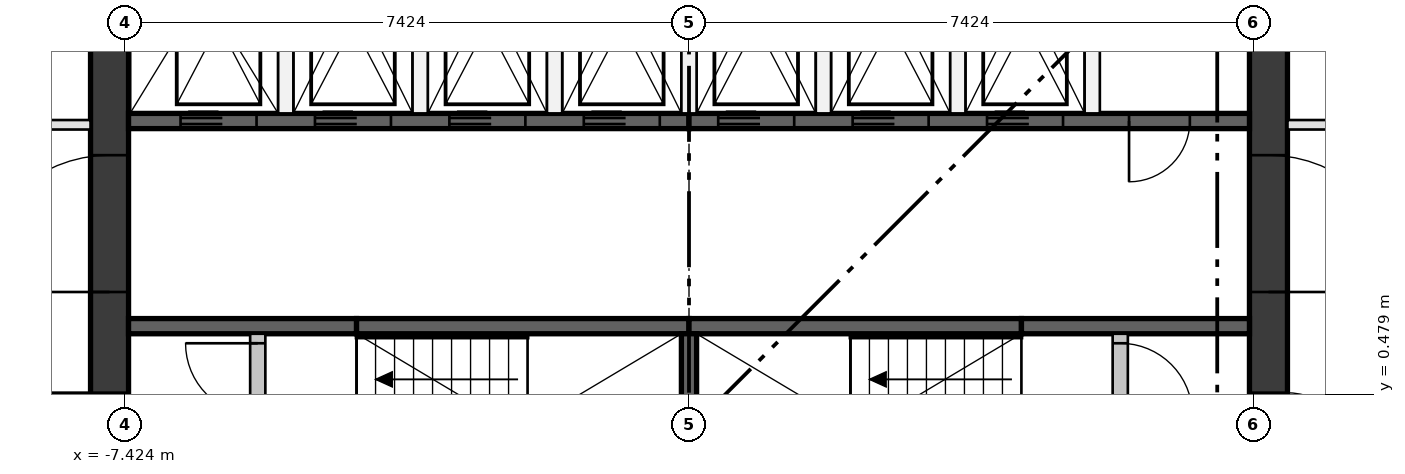
"""IFC4 building model, lengths in metres.
Left out: names, types, materials, properties, quantities, classifications, styles, units other than length and angle.
Written with IfcOpenShell. Run it as: python <this file> out.ifc"""

import sys

from ifc_helpers import new_model, si_unit, direction, frame, frame_2d, origin, place, context, subcontext, project, spatial, rectangle, extrude, element, fill, save


model = new_model("IFC4")
c1 = context("Model", 3, precision=1e-05, world=origin(), true_north=direction((0.0, 1.0)))
c2 = subcontext(c1, "Body", "Model", "MODEL_VIEW")
j1 = project(units=[si_unit("LENGTHUNIT", "METRE"), si_unit("PLANEANGLEUNIT", "RADIAN")], contexts=[c1])
p1 = place(None, origin())
s1 = spatial("IfcSite", under=j1, at=p1, CompositionType="ELEMENT")
p2 = place(p1, origin())
s2 = spatial("IfcBuilding", under=s1, at=p2, CompositionType="ELEMENT")
p3 = place(p2, frame((0.0, 0.0, 224.5)))
s3 = spatial("IfcBuildingStorey", under=s2, at=p3, CompositionType="ELEMENT", Elevation=224.5)
p4 = place(p3, frame((-7.624, -7.374, 0.0), z_axis=(0.0, 0.0, 1.0), x_axis=(0.0, 1.0, 0.0)))
e1 = element("IfcWall", 1, at=p4, inside=s3, PredefinedType="SHEAR", context=c2, shape_type="SweptSolid", body=[
    extrude(rectangle(XDim=14.748, YDim=0.5, at=frame_2d((7.374, 0.0))), origin(), (0.0, 0.0, 1.0), 3.35),
])
p5 = place(p4, frame((6.874, 0.0, 0.0)))
e2 = element("IfcOpeningElement", 2, at=p5, cuts=e1, PredefinedType="OPENING", context=c2, shape_type="SweptSolid", body=[
    extrude(rectangle(XDim=1.0, YDim=2.1, at=frame_2d((0.5, 1.05))), frame((0.0, 0.26, 0.0), z_axis=(0.0, -1.0, 0.0), x_axis=(1.0, 0.0, 0.0)), (0.0, 0.0, 1.0), 0.52),
])
p6 = place(p4, frame((3.75, 0.0, 0.0)))
e3 = element("IfcOpeningElement", 3, at=p6, cuts=e1, PredefinedType="OPENING", context=c2, shape_type="SweptSolid", body=[
    extrude(rectangle(XDim=1.8, YDim=2.1, at=frame_2d((0.9, 1.05))), frame((0.0, 0.26, 0.0), z_axis=(0.0, -1.0, 0.0), x_axis=(1.0, 0.0, 0.0)), (0.0, 0.0, 1.0), 0.52),
])
p7 = place(p4, frame((9.198, 0.0, 0.0)))
e4 = element("IfcOpeningElement", 4, at=p7, cuts=e1, PredefinedType="OPENING", context=c2, shape_type="SweptSolid", body=[
    extrude(rectangle(XDim=1.8, YDim=2.1, at=frame_2d((0.9, 1.05))), frame((0.0, 0.26, 0.0), z_axis=(0.0, -1.0, 0.0), x_axis=(1.0, 0.0, 0.0)), (0.0, 0.0, 1.0), 0.52),
])
p8 = place(p3, frame((7.624, -7.374, 0.0), z_axis=(0.0, 0.0, 1.0), x_axis=(0.0, 1.0, 0.0)))
e5 = element("IfcWall", 5, at=p8, inside=s3, PredefinedType="SHEAR", context=c2, shape_type="SweptSolid", body=[
    extrude(rectangle(XDim=14.748, YDim=0.5, at=frame_2d((7.374, 0.0))), origin(), (0.0, 0.0, 1.0), 3.35),
])
p9 = place(p8, frame((6.874, 0.0, 0.0)))
e6 = element("IfcOpeningElement", 6, at=p9, cuts=e5, PredefinedType="OPENING", context=c2, shape_type="SweptSolid", body=[
    extrude(rectangle(XDim=1.0, YDim=2.1, at=frame_2d((0.5, 1.05))), frame((0.0, 0.26, 0.0), z_axis=(0.0, -1.0, 0.0), x_axis=(1.0, 0.0, 0.0)), (0.0, 0.0, 1.0), 0.52),
])
p10 = place(p8, frame((3.75, 0.0, 0.0)))
e7 = element("IfcOpeningElement", 7, at=p10, cuts=e5, PredefinedType="OPENING", context=c2, shape_type="SweptSolid", body=[
    extrude(rectangle(XDim=1.8, YDim=2.1, at=frame_2d((0.9, 1.05))), frame((0.0, 0.26, 0.0), z_axis=(0.0, -1.0, 0.0), x_axis=(1.0, 0.0, 0.0)), (0.0, 0.0, 1.0), 0.52),
])
p11 = place(p8, frame((9.198, 0.0, 0.0)))
e8 = element("IfcOpeningElement", 8, at=p11, cuts=e5, PredefinedType="OPENING", context=c2, shape_type="SweptSolid", body=[
    extrude(rectangle(XDim=1.8, YDim=2.1, at=frame_2d((0.9, 1.05))), frame((0.0, 0.26, 0.0), z_axis=(0.0, -1.0, 0.0), x_axis=(1.0, 0.0, 0.0)), (0.0, 0.0, 1.0), 0.52),
])
p12 = place(p3, frame((-7.374, 4.074, 0.0), z_axis=(0.0, 0.0, 1.0), x_axis=(1.0, 0.0, 0.0)))
e9 = element("IfcWall", 9, at=p12, inside=s3, PredefinedType="SHEAR", context=c2, shape_type="SweptSolid", body=[
    extrude(rectangle(XDim=7.374, YDim=0.2, at=frame_2d((3.687, 0.0))), origin(), (0.0, 0.0, 1.0), 3.0),
])
p13 = place(p12, frame((0.684, 0.0, 0.0)))
e10 = element("IfcOpeningElement", 10, at=p13, cuts=e9, PredefinedType="OPENING", context=c2, shape_type="SweptSolid", body=[
    extrude(rectangle(XDim=1.0, YDim=2.1, at=frame_2d((0.5, 1.05))), frame((0.0, 0.11, 0.0), z_axis=(0.0, -1.0, 0.0), x_axis=(1.0, 0.0, 0.0)), (0.0, 0.0, 1.0), 0.22),
])
p14 = place(p12, frame((2.453, 0.0, 0.0)))
e11 = element("IfcOpeningElement", 11, at=p14, cuts=e9, PredefinedType="OPENING", context=c2, shape_type="SweptSolid", body=[
    extrude(rectangle(XDim=1.0, YDim=2.1, at=frame_2d((0.5, 1.05))), frame((0.0, 0.11, 0.0), z_axis=(0.0, -1.0, 0.0), x_axis=(1.0, 0.0, 0.0)), (0.0, 0.0, 1.0), 0.22),
])
p15 = place(p12, frame((4.221, 0.0, 0.0)))
e12 = element("IfcOpeningElement", 12, at=p15, cuts=e9, PredefinedType="OPENING", context=c2, shape_type="SweptSolid", body=[
    extrude(rectangle(XDim=1.0, YDim=2.1, at=frame_2d((0.5, 1.05))), frame((0.0, 0.11, 0.0), z_axis=(0.0, -1.0, 0.0), x_axis=(1.0, 0.0, 0.0)), (0.0, 0.0, 1.0), 0.22),
])
p16 = place(p12, frame((5.99, 0.0, 0.0)))
e13 = element("IfcOpeningElement", 13, at=p16, cuts=e9, PredefinedType="OPENING", context=c2, shape_type="SweptSolid", body=[
    extrude(rectangle(XDim=1.0, YDim=2.1, at=frame_2d((0.5, 1.05))), frame((0.0, 0.11, 0.0), z_axis=(0.0, -1.0, 0.0), x_axis=(1.0, 0.0, 0.0)), (0.0, 0.0, 1.0), 0.22),
])
p17 = place(p3, frame((0.0, 4.074, 0.0), z_axis=(0.0, 0.0, 1.0), x_axis=(1.0, 0.0, 0.0)))
e14 = element("IfcWall", 14, at=p17, inside=s3, PredefinedType="SHEAR", context=c2, shape_type="SweptSolid", body=[
    extrude(rectangle(XDim=7.374, YDim=0.2, at=frame_2d((3.687, 0.0))), origin(), (0.0, 0.0, 1.0), 3.0),
])
p18 = place(p17, frame((0.384, 0.0, 0.0)))
e15 = element("IfcOpeningElement", 15, at=p18, cuts=e14, PredefinedType="OPENING", context=c2, shape_type="SweptSolid", body=[
    extrude(rectangle(XDim=1.0, YDim=2.1, at=frame_2d((0.5, 1.05))), frame((0.0, 0.11, 0.0), z_axis=(0.0, -1.0, 0.0), x_axis=(1.0, 0.0, 0.0)), (0.0, 0.0, 1.0), 0.22),
])
p19 = place(p17, frame((2.153, 0.0, 0.0)))
e16 = element("IfcOpeningElement", 16, at=p19, cuts=e14, PredefinedType="OPENING", context=c2, shape_type="SweptSolid", body=[
    extrude(rectangle(XDim=1.0, YDim=2.1, at=frame_2d((0.5, 1.05))), frame((0.0, 0.11, 0.0), z_axis=(0.0, -1.0, 0.0), x_axis=(1.0, 0.0, 0.0)), (0.0, 0.0, 1.0), 0.22),
])
p20 = place(p17, frame((3.921, 0.0, 0.0)))
e17 = element("IfcOpeningElement", 17, at=p20, cuts=e14, PredefinedType="OPENING", context=c2, shape_type="SweptSolid", body=[
    extrude(rectangle(XDim=1.0, YDim=2.1, at=frame_2d((0.5, 1.05))), frame((0.0, 0.11, 0.0), z_axis=(0.0, -1.0, 0.0), x_axis=(1.0, 0.0, 0.0)), (0.0, 0.0, 1.0), 0.22),
])
p21 = place(p17, frame((5.79, 0.0, 0.0)))
e18 = element("IfcOpeningElement", 18, at=p21, cuts=e14, PredefinedType="OPENING", context=c2, shape_type="SweptSolid", body=[
    extrude(rectangle(XDim=0.8, YDim=2.1, at=frame_2d((0.4, 1.05))), frame((0.0, 0.11, 0.0), z_axis=(0.0, -1.0, 0.0), x_axis=(1.0, 0.0, 0.0)), (0.0, 0.0, 1.0), 0.22),
])
p22 = place(p3, frame((-7.374, 1.375, 0.0), z_axis=(0.0, 0.0, 1.0), x_axis=(1.0, 0.0, 0.0)))
e19 = element("IfcWall", 19, at=p22, inside=s3, PredefinedType="SHEAR", context=c2, shape_type="SweptSolid", body=[
    extrude(rectangle(XDim=3.0, YDim=0.2, at=frame_2d((1.5, 0.0))), origin(), (0.0, 0.0, 1.0), 3.0),
])
for number, where, z_axis, x_axis in (
    (20, (-4.374, 1.375, 0.0), (0.0, 0.0, 1.0), (1.0, 0.0, 0.0)),
    (21, (0.0, 1.375, 0.0), (0.0, 0.0, 1.0), (1.0, 0.0, 0.0)),
):
    element("IfcWall", number, at=place(p3, frame(where, z_axis=z_axis, x_axis=x_axis)), inside=s3, PredefinedType="SHEAR", context=c2, shape_type="SweptSolid", body=[
        extrude(rectangle(XDim=4.374, YDim=0.2, at=frame_2d((2.187, 0.0))), origin(), (0.0, 0.0, 1.0), 3.0),
    ])
p23 = place(p3, frame((4.374, 1.375, 0.0), z_axis=(0.0, 0.0, 1.0), x_axis=(1.0, 0.0, 0.0)))
e22 = element("IfcWall", 22, at=p23, inside=s3, PredefinedType="SHEAR", context=c2, shape_type="SweptSolid", body=[
    extrude(rectangle(XDim=3.0, YDim=0.2, at=frame_2d((1.5, 0.0))), origin(), (0.0, 0.0, 1.0), 3.0),
])
p24 = place(p3, frame((0.0, -1.275, 0.0), z_axis=(0.0, 0.0, 1.0), x_axis=(0.0, 1.0, 0.0)))
e23 = element("IfcWall", 23, at=p24, inside=s3, PredefinedType="SHEAR", context=c2, shape_type="SweptSolid", body=[
    extrude(rectangle(XDim=2.55, YDim=0.2, at=frame_2d((1.275, 0.0))), origin(), (0.0, 0.0, 1.0), 3.0),
])
for number, where, z_axis, x_axis in (
    (24, (-5.305, 4.174, 0.0), (0.0, 0.0, 1.0), (0.0, 1.0, 0.0)),
    (25, (-3.537, 4.174, 0.0), (0.0, 0.0, 1.0), (0.0, 1.0, 0.0)),
    (26, (-1.769, 4.174, 0.0), (0.0, 0.0, 1.0), (0.0, 1.0, 0.0)),
    (27, (0.0, 4.174, 0.0), (0.0, 0.0, 1.0), (0.0, 1.0, 0.0)),
    (28, (1.769, 4.174, 0.0), (0.0, 0.0, 1.0), (0.0, 1.0, 0.0)),
    (29, (3.537, 4.174, 0.0), (0.0, 0.0, 1.0), (0.0, 1.0, 0.0)),
    (30, (5.305, 4.174, 0.0), (0.0, 0.0, 1.0), (0.0, 1.0, 0.0)),
):
    element("IfcWall", number, at=place(p3, frame(where, z_axis=z_axis, x_axis=x_axis)), inside=s3, PredefinedType="PARTITIONING", context=c2, shape_type="SweptSolid", body=[
        extrude(rectangle(XDim=3.2, YDim=0.2, at=frame_2d((1.6, 0.0))), origin(), (0.0, 0.0, 1.0), 3.0),
    ])
p25 = place(p3, frame((-5.674, -1.275, 0.0), z_axis=(0.0, 0.0, 1.0), x_axis=(0.0, 1.0, 0.0)))
e31 = element("IfcWall", 31, at=p25, inside=s3, PredefinedType="PARTITIONING", context=c2, shape_type="SweptSolid", body=[
    extrude(rectangle(XDim=2.55, YDim=0.2, at=frame_2d((1.275, 0.0))), origin(), (0.0, 0.0, 1.0), 3.0),
])
p26 = place(p25, frame((0.125, 0.0, 0.0)))
e32 = element("IfcOpeningElement", 32, at=p26, cuts=e31, PredefinedType="OPENING", context=c2, shape_type="SweptSolid", body=[
    extrude(rectangle(XDim=0.95, YDim=2.1, at=frame_2d((0.475, 1.05))), frame((0.0, 0.11, 0.0), z_axis=(0.0, -1.0, 0.0), x_axis=(1.0, 0.0, 0.0)), (0.0, 0.0, 1.0), 0.22),
])
p27 = place(p25, frame((1.475, 0.0, 0.0)))
e33 = element("IfcOpeningElement", 33, at=p27, cuts=e31, PredefinedType="OPENING", context=c2, shape_type="SweptSolid", body=[
    extrude(rectangle(XDim=0.95, YDim=2.1, at=frame_2d((0.475, 1.05))), frame((0.0, 0.11, 0.0), z_axis=(0.0, -1.0, 0.0), x_axis=(1.0, 0.0, 0.0)), (0.0, 0.0, 1.0), 0.22),
])
p28 = place(p3, frame((5.674, -1.275, 0.0), z_axis=(0.0, 0.0, 1.0), x_axis=(0.0, 1.0, 0.0)))
e34 = element("IfcWall", 34, at=p28, inside=s3, PredefinedType="PARTITIONING", context=c2, shape_type="SweptSolid", body=[
    extrude(rectangle(XDim=2.55, YDim=0.2, at=frame_2d((1.275, 0.0))), origin(), (0.0, 0.0, 1.0), 3.0),
])
p29 = place(p28, frame((0.125, 0.0, 0.0)))
e35 = element("IfcOpeningElement", 35, at=p29, cuts=e34, PredefinedType="OPENING", context=c2, shape_type="SweptSolid", body=[
    extrude(rectangle(XDim=0.95, YDim=2.1, at=frame_2d((0.475, 1.05))), frame((0.0, 0.11, 0.0), z_axis=(0.0, -1.0, 0.0), x_axis=(1.0, 0.0, 0.0)), (0.0, 0.0, 1.0), 0.22),
])
p30 = place(p28, frame((1.475, 0.0, 0.0)))
e36 = element("IfcOpeningElement", 36, at=p30, cuts=e34, PredefinedType="OPENING", context=c2, shape_type="SweptSolid", body=[
    extrude(rectangle(XDim=0.95, YDim=2.1, at=frame_2d((0.475, 1.05))), frame((0.0, 0.11, 0.0), z_axis=(0.0, -1.0, 0.0), x_axis=(1.0, 0.0, 0.0)), (0.0, 0.0, 1.0), 0.22),
])
p31 = place(p3, frame((7.874, 4.024, 0.0), z_axis=(0.0, 0.0, 1.0), x_axis=(1.0, 0.0, 0.0)))
e37 = element("IfcWall", 37, at=p31, inside=s3, PredefinedType="PARTITIONING", context=c2, shape_type="SweptSolid", body=[
    extrude(rectangle(XDim=2.317, YDim=0.125, at=frame_2d((1.158, 0.0))), origin(), (0.0, 0.0, 1.0), 3.0),
])
p32 = place(p31, frame((0.7, 0.0, 0.0)))
e38 = element("IfcOpeningElement", 38, at=p32, cuts=e37, PredefinedType="OPENING", context=c2, shape_type="SweptSolid", body=[
    extrude(rectangle(XDim=1.0, YDim=2.1, at=frame_2d((0.5, 1.05))), frame((0.0, 0.073, 0.0), z_axis=(0.0, -1.0, 0.0), x_axis=(1.0, 0.0, 0.0)), (0.0, 0.0, 1.0), 0.145),
])
p33 = place(p3, frame((-10.296, 4.024, 0.0), z_axis=(0.0, 0.0, 1.0), x_axis=(1.0, 0.0, 0.0)))
e39 = element("IfcWall", 39, at=p33, inside=s3, PredefinedType="PARTITIONING", context=c2, shape_type="SweptSolid", body=[
    extrude(rectangle(XDim=2.422, YDim=0.125, at=frame_2d((1.211, 0.0))), origin(), (0.0, 0.0, 1.0), 3.0),
])
p34 = place(p33, frame((0.7, 0.0, 0.0)))
e40 = element("IfcOpeningElement", 40, at=p34, cuts=e39, PredefinedType="OPENING", context=c2, shape_type="SweptSolid", body=[
    extrude(rectangle(XDim=1.0, YDim=2.1, at=frame_2d((0.5, 1.05))), frame((0.0, 0.073, 0.0), z_axis=(0.0, -1.0, 0.0), x_axis=(1.0, 0.0, 0.0)), (0.0, 0.0, 1.0), 0.145),
])
p35 = place(p13, frame((1.0, 0.0, 0.0), z_axis=(0.0, 0.0, 1.0), x_axis=(-1.0, 0.0, 0.0)))
e41 = element("IfcDoor", 41, at=p35, inside=s3, OperationType="DOUBLE_DOOR_SLIDING", PredefinedType="DOOR", context=c2, shape_type="SweptSolid", body=[
    extrude(rectangle(XDim=1.0, YDim=2.1, at=frame_2d((0.5, 1.05))), frame((0.0, 0.025, 0.0), z_axis=(0.0, -1.0, 0.0), x_axis=(1.0, 0.0, 0.0)), (0.0, 0.0, 1.0), 0.05),
])
fill(e10, e41)
p36 = place(p14, frame((1.0, 0.0, 0.0), z_axis=(0.0, 0.0, 1.0), x_axis=(-1.0, 0.0, 0.0)))
e42 = element("IfcDoor", 42, at=p36, inside=s3, OperationType="DOUBLE_DOOR_SLIDING", PredefinedType="DOOR", context=c2, shape_type="SweptSolid", body=[
    extrude(rectangle(XDim=1.0, YDim=2.1, at=frame_2d((0.5, 1.05))), frame((0.0, 0.025, 0.0), z_axis=(0.0, -1.0, 0.0), x_axis=(1.0, 0.0, 0.0)), (0.0, 0.0, 1.0), 0.05),
])
fill(e11, e42)
p37 = place(p15, frame((1.0, 0.0, 0.0), z_axis=(0.0, 0.0, 1.0), x_axis=(-1.0, 0.0, 0.0)))
e43 = element("IfcDoor", 43, at=p37, inside=s3, OperationType="DOUBLE_DOOR_SLIDING", PredefinedType="DOOR", context=c2, shape_type="SweptSolid", body=[
    extrude(rectangle(XDim=1.0, YDim=2.1, at=frame_2d((0.5, 1.05))), frame((0.0, 0.025, 0.0), z_axis=(0.0, -1.0, 0.0), x_axis=(1.0, 0.0, 0.0)), (0.0, 0.0, 1.0), 0.05),
])
fill(e12, e43)
p38 = place(p16, frame((1.0, 0.0, 0.0), z_axis=(0.0, 0.0, 1.0), x_axis=(-1.0, 0.0, 0.0)))
e44 = element("IfcDoor", 44, at=p38, inside=s3, OperationType="DOUBLE_DOOR_SLIDING", PredefinedType="DOOR", context=c2, shape_type="SweptSolid", body=[
    extrude(rectangle(XDim=1.0, YDim=2.1, at=frame_2d((0.5, 1.05))), frame((0.0, 0.025, 0.0), z_axis=(0.0, -1.0, 0.0), x_axis=(1.0, 0.0, 0.0)), (0.0, 0.0, 1.0), 0.05),
])
fill(e13, e44)
p39 = place(p18, frame((1.0, 0.0, 0.0), z_axis=(0.0, 0.0, 1.0), x_axis=(-1.0, 0.0, 0.0)))
e45 = element("IfcDoor", 45, at=p39, inside=s3, OperationType="DOUBLE_DOOR_SLIDING", PredefinedType="DOOR", context=c2, shape_type="SweptSolid", body=[
    extrude(rectangle(XDim=1.0, YDim=2.1, at=frame_2d((0.5, 1.05))), frame((0.0, 0.025, 0.0), z_axis=(0.0, -1.0, 0.0), x_axis=(1.0, 0.0, 0.0)), (0.0, 0.0, 1.0), 0.05),
])
fill(e15, e45)
p40 = place(p19, frame((1.0, 0.0, 0.0), z_axis=(0.0, 0.0, 1.0), x_axis=(-1.0, 0.0, 0.0)))
e46 = element("IfcDoor", 46, at=p40, inside=s3, OperationType="DOUBLE_DOOR_SLIDING", PredefinedType="DOOR", context=c2, shape_type="SweptSolid", body=[
    extrude(rectangle(XDim=1.0, YDim=2.1, at=frame_2d((0.5, 1.05))), frame((0.0, 0.025, 0.0), z_axis=(0.0, -1.0, 0.0), x_axis=(1.0, 0.0, 0.0)), (0.0, 0.0, 1.0), 0.05),
])
fill(e16, e46)
p41 = place(p20, frame((1.0, 0.0, 0.0), z_axis=(0.0, 0.0, 1.0), x_axis=(-1.0, 0.0, 0.0)))
e47 = element("IfcDoor", 47, at=p41, inside=s3, OperationType="DOUBLE_DOOR_SLIDING", PredefinedType="DOOR", context=c2, shape_type="SweptSolid", body=[
    extrude(rectangle(XDim=1.0, YDim=2.1, at=frame_2d((0.5, 1.05))), frame((0.0, 0.025, 0.0), z_axis=(0.0, -1.0, 0.0), x_axis=(1.0, 0.0, 0.0)), (0.0, 0.0, 1.0), 0.05),
])
fill(e17, e47)
p42 = place(p27, origin())
e48 = element("IfcDoor", 48, at=p42, inside=s3, OperationType="SINGLE_SWING_RIGHT", PredefinedType="DOOR", context=c2, shape_type="SweptSolid", body=[
    extrude(rectangle(XDim=0.95, YDim=2.1, at=frame_2d((0.475, 1.05))), frame((0.0, 0.025, 0.0), z_axis=(0.0, -1.0, 0.0), x_axis=(1.0, 0.0, 0.0)), (0.0, 0.0, 1.0), 0.05),
])
fill(e33, e48)
p43 = place(p30, frame((0.95, 0.0, 0.0), z_axis=(0.0, 0.0, 1.0), x_axis=(-1.0, 0.0, 0.0)))
e49 = element("IfcDoor", 49, at=p43, inside=s3, OperationType="SINGLE_SWING_LEFT", PredefinedType="DOOR", context=c2, shape_type="SweptSolid", body=[
    extrude(rectangle(XDim=0.95, YDim=2.1, at=frame_2d((0.475, 1.05))), frame((0.0, 0.025, 0.0), z_axis=(0.0, -1.0, 0.0), x_axis=(1.0, 0.0, 0.0)), (0.0, 0.0, 1.0), 0.05),
])
fill(e36, e49)
p44 = place(p21, frame((0.8, 0.0, 0.0), z_axis=(0.0, 0.0, 1.0), x_axis=(-1.0, 0.0, 0.0)))
e50 = element("IfcDoor", 50, at=p44, inside=s3, OperationType="SINGLE_SWING_LEFT", PredefinedType="DOOR", context=c2, shape_type="SweptSolid", body=[
    extrude(rectangle(XDim=0.8, YDim=2.1, at=frame_2d((0.4, 1.05))), frame((0.0, 0.025, 0.0), z_axis=(0.0, -1.0, 0.0), x_axis=(1.0, 0.0, 0.0)), (0.0, 0.0, 1.0), 0.05),
])
fill(e18, e50)
p45 = place(p5, origin())
e51 = element("IfcDoor", 51, at=p45, inside=s3, OperationType="SINGLE_SWING_RIGHT", PredefinedType="DOOR", context=c2, shape_type="SweptSolid", body=[
    extrude(rectangle(XDim=1.0, YDim=2.1, at=frame_2d((0.5, 1.05))), frame((0.0, 0.25, 0.0), z_axis=(0.0, -1.0, 0.0), x_axis=(1.0, 0.0, 0.0)), (0.0, 0.0, 1.0), 0.05),
])
fill(e2, e51)
p46 = place(p7, origin())
e52 = element("IfcDoor", 52, at=p46, inside=s3, OperationType="DOUBLE_DOOR_SINGLE_SWING", PredefinedType="DOOR", context=c2, shape_type="SweptSolid", body=[
    extrude(rectangle(XDim=1.8, YDim=2.1, at=frame_2d((0.9, 1.05))), frame((0.0, 0.025, 0.0), z_axis=(0.0, -1.0, 0.0), x_axis=(1.0, 0.0, 0.0)), (0.0, 0.0, 1.0), 0.05),
])
fill(e4, e52)
p47 = place(p9, frame((1.0, 0.0, 0.0), z_axis=(0.0, 0.0, 1.0), x_axis=(-1.0, 0.0, 0.0)))
e53 = element("IfcDoor", 53, at=p47, inside=s3, OperationType="SINGLE_SWING_LEFT", PredefinedType="DOOR", context=c2, shape_type="SweptSolid", body=[
    extrude(rectangle(XDim=1.0, YDim=2.1, at=frame_2d((0.5, 1.05))), frame((0.0, 0.25, 0.0), z_axis=(0.0, -1.0, 0.0), x_axis=(1.0, 0.0, 0.0)), (0.0, 0.0, 1.0), 0.05),
])
fill(e6, e53)
p48 = place(p11, frame((1.8, 0.0, 0.0), z_axis=(0.0, 0.0, 1.0), x_axis=(-1.0, 0.0, 0.0)))
e54 = element("IfcDoor", 54, at=p48, inside=s3, OperationType="DOUBLE_DOOR_SINGLE_SWING", PredefinedType="DOOR", context=c2, shape_type="SweptSolid", body=[
    extrude(rectangle(XDim=1.8, YDim=2.1, at=frame_2d((0.9, 1.05))), frame((0.0, 0.025, 0.0), z_axis=(0.0, -1.0, 0.0), x_axis=(1.0, 0.0, 0.0)), (0.0, 0.0, 1.0), 0.05),
])
fill(e8, e54)
save(model, sys.argv[1])
